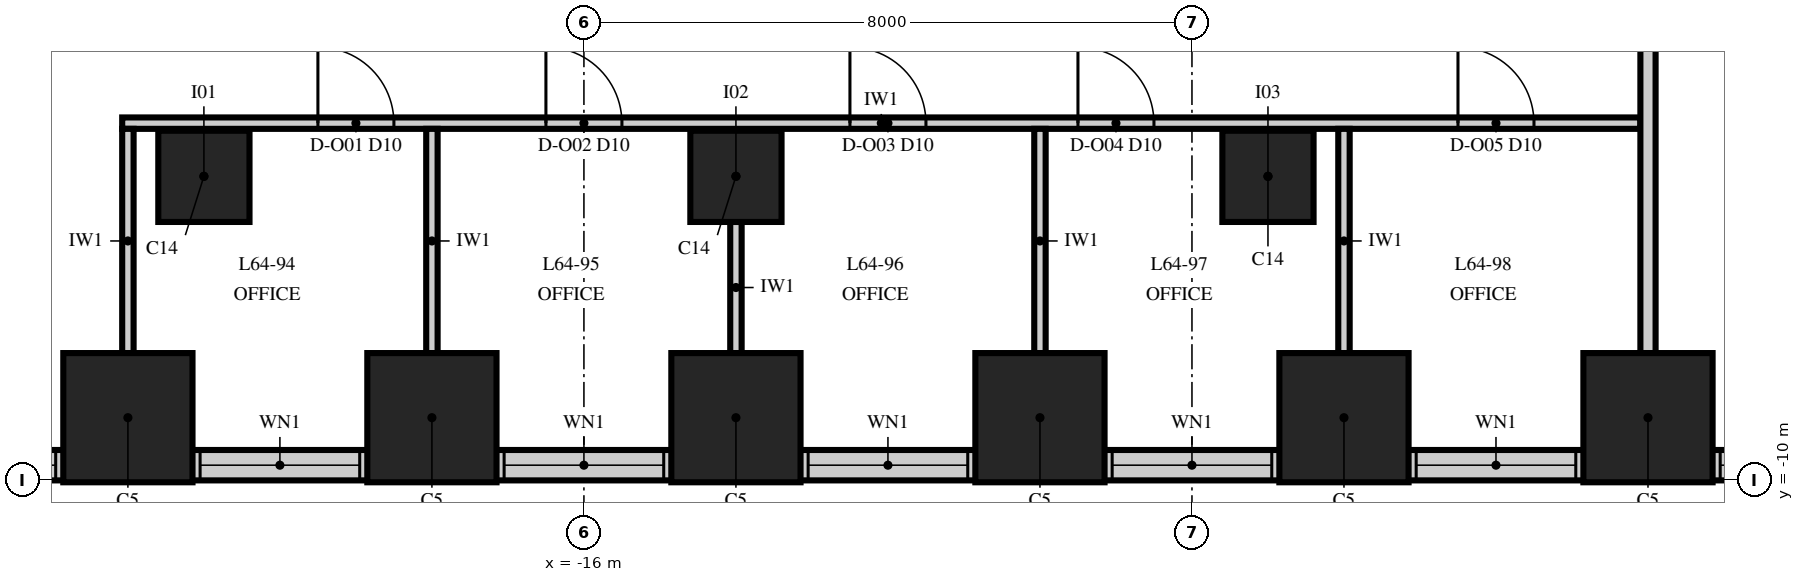
"""IFC4 building model, lengths in metres.
Left out: names, types, materials, properties, quantities, classifications, styles, units other than length and angle.
Written with IfcOpenShell. Run it as: python <this file> out.ifc"""

import sys

from ifc_helpers import new_model, si_unit, direction, frame, frame_2d, origin, origin_2d, place, context, subcontext, project, spatial, rectangle, extrude, element, fill, save


model = new_model("IFC4")
c1 = context("Model", 3, precision=1e-05, world=origin(), true_north=direction((0.0, 1.0)))
c2 = subcontext(c1, "Body", "Model", "MODEL_VIEW")
j1 = project(units=[si_unit("LENGTHUNIT", "METRE"), si_unit("PLANEANGLEUNIT", "RADIAN")], contexts=[c1])
p1 = place(None, origin())
s1 = spatial("IfcSite", under=j1, at=p1, CompositionType="ELEMENT")
p2 = place(p1, origin())
s2 = spatial("IfcBuilding", under=s1, at=p2, CompositionType="ELEMENT")
p3 = place(p2, frame((0.0, 0.0, 276.0)))
s3 = spatial("IfcBuildingStorey", under=s2, at=p3, CompositionType="ELEMENT", Elevation=276.0)
for number, where, z_axis, x_axis in (
    (1, (-22.0, -9.175, 0.0), (0.0, 0.0, 1.0), (1.0, 0.0, 0.0)),
    (2, (-18.0, -9.175, 0.0), (0.0, 0.0, 1.0), (1.0, 0.0, 0.0)),
    (3, (-14.0, -9.175, 0.0), (0.0, 0.0, 1.0), (1.0, 0.0, 0.0)),
    (4, (-10.0, -9.175, 0.0), (0.0, 0.0, 1.0), (1.0, 0.0, 0.0)),
    (5, (-6.0, -9.175, 0.0), (0.0, 0.0, 1.0), (1.0, 0.0, 0.0)),
    (6, (-2.0, -9.175, 0.0), (0.0, 0.0, 1.0), (1.0, 0.0, 0.0)),
):
    element("IfcColumn", number, at=place(p3, frame(where, z_axis=z_axis, x_axis=x_axis)), inside=s3, PredefinedType="COLUMN", context=c2, shape_type="SweptSolid", body=[
        extrude(rectangle(XDim=1.7, YDim=1.7, at=origin_2d()), origin(), (0.0, 0.0, 1.0), 4.0),
    ])
for number, where, z_axis, x_axis in (
    (7, (-21.0, -6.0, 0.0), (0.0, 0.0, 1.0), (1.0, 0.0, 0.0)),
    (8, (-14.0, -6.0, 0.0), (0.0, 0.0, 1.0), (1.0, 0.0, 0.0)),
    (9, (-7.0, -6.0, 0.0), (0.0, 0.0, 1.0), (1.0, 0.0, 0.0)),
):
    element("IfcColumn", number, at=place(p3, frame(where, z_axis=z_axis, x_axis=x_axis)), inside=s3, PredefinedType="COLUMN", context=c2, shape_type="SweptSolid", body=[
        extrude(rectangle(XDim=1.2, YDim=1.2, at=origin_2d()), origin(), (0.0, 0.0, 1.0), 4.0),
    ])
p4 = place(p3, frame((-26.0, -9.8, 0.0), z_axis=(0.0, 0.0, 1.0), x_axis=(1.0, 0.0, 0.0)))
e10 = element("IfcWall", 10, at=p4, inside=s3, PredefinedType="SOLIDWALL", context=c2, shape_type="SweptSolid", body=[
    extrude(rectangle(XDim=52.0, YDim=0.4, at=frame_2d((26.0, 0.0))), origin(), (0.0, 0.0, 1.0), 2.0),
])
p5 = place(p4, frame((0.95, 0.0, 0.8)))
e11 = element("IfcOpeningElement", 11, at=p5, cuts=e10, PredefinedType="OPENING", context=c2, shape_type="SweptSolid", body=[
    extrude(rectangle(XDim=2.1, YDim=1.15, at=frame_2d((1.05, 0.575))), frame((0.0, 0.215, 0.0), z_axis=(0.0, -1.0, 0.0), x_axis=(1.0, 0.0, 0.0)), (0.0, 0.0, 1.0), 0.43),
])
p6 = place(p4, frame((4.95, 0.0, 0.8)))
e12 = element("IfcOpeningElement", 12, at=p6, cuts=e10, PredefinedType="OPENING", context=c2, shape_type="SweptSolid", body=[
    extrude(rectangle(XDim=2.1, YDim=1.15, at=frame_2d((1.05, 0.575))), frame((0.0, 0.215, 0.0), z_axis=(0.0, -1.0, 0.0), x_axis=(1.0, 0.0, 0.0)), (0.0, 0.0, 1.0), 0.43),
])
p7 = place(p4, frame((8.95, 0.0, 0.8)))
e13 = element("IfcOpeningElement", 13, at=p7, cuts=e10, PredefinedType="OPENING", context=c2, shape_type="SweptSolid", body=[
    extrude(rectangle(XDim=2.1, YDim=1.15, at=frame_2d((1.05, 0.575))), frame((0.0, 0.215, 0.0), z_axis=(0.0, -1.0, 0.0), x_axis=(1.0, 0.0, 0.0)), (0.0, 0.0, 1.0), 0.43),
])
p8 = place(p4, frame((12.95, 0.0, 0.8)))
e14 = element("IfcOpeningElement", 14, at=p8, cuts=e10, PredefinedType="OPENING", context=c2, shape_type="SweptSolid", body=[
    extrude(rectangle(XDim=2.1, YDim=1.15, at=frame_2d((1.05, 0.575))), frame((0.0, 0.215, 0.0), z_axis=(0.0, -1.0, 0.0), x_axis=(1.0, 0.0, 0.0)), (0.0, 0.0, 1.0), 0.43),
])
p9 = place(p4, frame((16.95, 0.0, 0.8)))
e15 = element("IfcOpeningElement", 15, at=p9, cuts=e10, PredefinedType="OPENING", context=c2, shape_type="SweptSolid", body=[
    extrude(rectangle(XDim=2.1, YDim=1.15, at=frame_2d((1.05, 0.575))), frame((0.0, 0.215, 0.0), z_axis=(0.0, -1.0, 0.0), x_axis=(1.0, 0.0, 0.0)), (0.0, 0.0, 1.0), 0.43),
])
p10 = place(p4, frame((20.95, 0.0, 0.8)))
e16 = element("IfcOpeningElement", 16, at=p10, cuts=e10, PredefinedType="OPENING", context=c2, shape_type="SweptSolid", body=[
    extrude(rectangle(XDim=2.1, YDim=1.15, at=frame_2d((1.05, 0.575))), frame((0.0, 0.215, 0.0), z_axis=(0.0, -1.0, 0.0), x_axis=(1.0, 0.0, 0.0)), (0.0, 0.0, 1.0), 0.43),
])
p11 = place(p4, frame((24.95, 0.0, 0.8)))
e17 = element("IfcOpeningElement", 17, at=p11, cuts=e10, PredefinedType="OPENING", context=c2, shape_type="SweptSolid", body=[
    extrude(rectangle(XDim=2.1, YDim=1.15, at=frame_2d((1.05, 0.575))), frame((0.0, 0.215, 0.0), z_axis=(0.0, -1.0, 0.0), x_axis=(1.0, 0.0, 0.0)), (0.0, 0.0, 1.0), 0.43),
])
p12 = place(p4, frame((28.95, 0.0, 0.8)))
e18 = element("IfcOpeningElement", 18, at=p12, cuts=e10, PredefinedType="OPENING", context=c2, shape_type="SweptSolid", body=[
    extrude(rectangle(XDim=2.1, YDim=1.15, at=frame_2d((1.05, 0.575))), frame((0.0, 0.215, 0.0), z_axis=(0.0, -1.0, 0.0), x_axis=(1.0, 0.0, 0.0)), (0.0, 0.0, 1.0), 0.43),
])
p13 = place(p4, frame((32.95, 0.0, 0.8)))
e19 = element("IfcOpeningElement", 19, at=p13, cuts=e10, PredefinedType="OPENING", context=c2, shape_type="SweptSolid", body=[
    extrude(rectangle(XDim=2.1, YDim=1.15, at=frame_2d((1.05, 0.575))), frame((0.0, 0.215, 0.0), z_axis=(0.0, -1.0, 0.0), x_axis=(1.0, 0.0, 0.0)), (0.0, 0.0, 1.0), 0.43),
])
p14 = place(p4, frame((36.95, 0.0, 0.8)))
e20 = element("IfcOpeningElement", 20, at=p14, cuts=e10, PredefinedType="OPENING", context=c2, shape_type="SweptSolid", body=[
    extrude(rectangle(XDim=2.1, YDim=1.15, at=frame_2d((1.05, 0.575))), frame((0.0, 0.215, 0.0), z_axis=(0.0, -1.0, 0.0), x_axis=(1.0, 0.0, 0.0)), (0.0, 0.0, 1.0), 0.43),
])
p15 = place(p4, frame((40.95, 0.0, 0.8)))
e21 = element("IfcOpeningElement", 21, at=p15, cuts=e10, PredefinedType="OPENING", context=c2, shape_type="SweptSolid", body=[
    extrude(rectangle(XDim=2.1, YDim=1.15, at=frame_2d((1.05, 0.575))), frame((0.0, 0.215, 0.0), z_axis=(0.0, -1.0, 0.0), x_axis=(1.0, 0.0, 0.0)), (0.0, 0.0, 1.0), 0.43),
])
p16 = place(p4, frame((44.95, 0.0, 0.8)))
e22 = element("IfcOpeningElement", 22, at=p16, cuts=e10, PredefinedType="OPENING", context=c2, shape_type="SweptSolid", body=[
    extrude(rectangle(XDim=2.1, YDim=1.15, at=frame_2d((1.05, 0.575))), frame((0.0, 0.215, 0.0), z_axis=(0.0, -1.0, 0.0), x_axis=(1.0, 0.0, 0.0)), (0.0, 0.0, 1.0), 0.43),
])
p17 = place(p4, frame((48.95, 0.0, 0.8)))
e23 = element("IfcOpeningElement", 23, at=p17, cuts=e10, PredefinedType="OPENING", context=c2, shape_type="SweptSolid", body=[
    extrude(rectangle(XDim=2.1, YDim=1.15, at=frame_2d((1.05, 0.575))), frame((0.0, 0.215, 0.0), z_axis=(0.0, -1.0, 0.0), x_axis=(1.0, 0.0, 0.0)), (0.0, 0.0, 1.0), 0.43),
])
p18 = place(p3, frame((-22.075, -5.3, 0.0), z_axis=(0.0, 0.0, 1.0), x_axis=(1.0, 0.0, 0.0)))
e24 = element("IfcWall", 24, at=p18, inside=s3, PredefinedType="PARTITIONING", context=c2, shape_type="SweptSolid", body=[
    extrude(rectangle(XDim=19.975, YDim=0.15, at=frame_2d((9.987, 0.0))), origin(), (0.0, 0.0, 1.0), 3.23),
])
p19 = place(p18, frame((2.575, 0.0, 0.0)))
e25 = element("IfcOpeningElement", 25, at=p19, cuts=e24, PredefinedType="OPENING", context=c2, shape_type="SweptSolid", body=[
    extrude(rectangle(XDim=1.0, YDim=2.3, at=frame_2d((0.5, 1.15))), frame((0.0, 0.09, 0.0), z_axis=(0.0, -1.0, 0.0), x_axis=(1.0, 0.0, 0.0)), (0.0, 0.0, 1.0), 0.18),
])
p20 = place(p18, frame((5.575, 0.0, 0.0)))
e26 = element("IfcOpeningElement", 26, at=p20, cuts=e24, PredefinedType="OPENING", context=c2, shape_type="SweptSolid", body=[
    extrude(rectangle(XDim=1.0, YDim=2.3, at=frame_2d((0.5, 1.15))), frame((0.0, 0.09, 0.0), z_axis=(0.0, -1.0, 0.0), x_axis=(1.0, 0.0, 0.0)), (0.0, 0.0, 1.0), 0.18),
])
p21 = place(p18, frame((9.575, 0.0, 0.0)))
e27 = element("IfcOpeningElement", 27, at=p21, cuts=e24, PredefinedType="OPENING", context=c2, shape_type="SweptSolid", body=[
    extrude(rectangle(XDim=1.0, YDim=2.3, at=frame_2d((0.5, 1.15))), frame((0.0, 0.09, 0.0), z_axis=(0.0, -1.0, 0.0), x_axis=(1.0, 0.0, 0.0)), (0.0, 0.0, 1.0), 0.18),
])
p22 = place(p18, frame((12.575, 0.0, 0.0)))
e28 = element("IfcOpeningElement", 28, at=p22, cuts=e24, PredefinedType="OPENING", context=c2, shape_type="SweptSolid", body=[
    extrude(rectangle(XDim=1.0, YDim=2.3, at=frame_2d((0.5, 1.15))), frame((0.0, 0.09, 0.0), z_axis=(0.0, -1.0, 0.0), x_axis=(1.0, 0.0, 0.0)), (0.0, 0.0, 1.0), 0.18),
])
p23 = place(p18, frame((17.575, 0.0, 0.0)))
e29 = element("IfcOpeningElement", 29, at=p23, cuts=e24, PredefinedType="OPENING", context=c2, shape_type="SweptSolid", body=[
    extrude(rectangle(XDim=1.0, YDim=2.3, at=frame_2d((0.5, 1.15))), frame((0.0, 0.09, 0.0), z_axis=(0.0, -1.0, 0.0), x_axis=(1.0, 0.0, 0.0)), (0.0, 0.0, 1.0), 0.18),
])
for number, where, z_axis, x_axis in (
    (30, (-22.0, -8.325, 0.0), (0.0, 0.0, 1.0), (0.0, 1.0, 0.0)),
    (31, (-18.0, -8.325, 0.0), (0.0, 0.0, 1.0), (0.0, 1.0, 0.0)),
):
    element("IfcWall", number, at=place(p3, frame(where, z_axis=z_axis, x_axis=x_axis)), inside=s3, PredefinedType="PARTITIONING", context=c2, shape_type="SweptSolid", body=[
        extrude(rectangle(XDim=2.95, YDim=0.15, at=frame_2d((1.475, 0.0))), origin(), (0.0, 0.0, 1.0), 2.842),
    ])
p24 = place(p3, frame((-14.0, -8.325, 0.0), z_axis=(0.0, 0.0, 1.0), x_axis=(0.0, 1.0, 0.0)))
e32 = element("IfcWall", 32, at=p24, inside=s3, PredefinedType="PARTITIONING", context=c2, shape_type="SweptSolid", body=[
    extrude(rectangle(XDim=1.725, YDim=0.15, at=frame_2d((0.862, 0.0))), origin(), (0.0, 0.0, 1.0), 3.23),
])
for number, where, z_axis, x_axis in (
    (33, (-10.0, -8.325, 0.0), (0.0, 0.0, 1.0), (0.0, 1.0, 0.0)),
    (34, (-6.0, -8.325, 0.0), (0.0, 0.0, 1.0), (0.0, 1.0, 0.0)),
):
    element("IfcWall", number, at=place(p3, frame(where, z_axis=z_axis, x_axis=x_axis)), inside=s3, PredefinedType="PARTITIONING", context=c2, shape_type="SweptSolid", body=[
        extrude(rectangle(XDim=2.95, YDim=0.15, at=frame_2d((1.475, 0.0))), origin(), (0.0, 0.0, 1.0), 2.842),
    ])
p25 = place(p3, frame((-2.0, -8.325, 0.0), z_axis=(0.0, 0.0, 1.0), x_axis=(0.0, 1.0, 0.0)))
e35 = element("IfcWall", 35, at=p25, inside=s3, PredefinedType="PARTITIONING", context=c2, shape_type="SweptSolid", body=[
    extrude(rectangle(XDim=12.175, YDim=0.2, at=frame_2d((6.087, 0.0))), origin(), (0.0, 0.0, 1.0), 2.842),
])
p26 = place(p5, origin())
e36 = element("IfcWindow", 36, at=p26, inside=s3, PartitioningType="SINGLE_PANEL", PredefinedType="WINDOW", context=c2, shape_type="SweptSolid", body=[
    extrude(rectangle(XDim=2.1, YDim=1.15, at=frame_2d((1.05, 0.575))), frame((0.0, 0.03, 0.0), z_axis=(0.0, -1.0, 0.0), x_axis=(1.0, 0.0, 0.0)), (0.0, 0.0, 1.0), 0.06),
])
fill(e11, e36)
p27 = place(p6, origin())
e37 = element("IfcWindow", 37, at=p27, inside=s3, PartitioningType="SINGLE_PANEL", PredefinedType="WINDOW", context=c2, shape_type="SweptSolid", body=[
    extrude(rectangle(XDim=2.1, YDim=1.15, at=frame_2d((1.05, 0.575))), frame((0.0, 0.03, 0.0), z_axis=(0.0, -1.0, 0.0), x_axis=(1.0, 0.0, 0.0)), (0.0, 0.0, 1.0), 0.06),
])
fill(e12, e37)
p28 = place(p7, origin())
e38 = element("IfcWindow", 38, at=p28, inside=s3, PartitioningType="SINGLE_PANEL", PredefinedType="WINDOW", context=c2, shape_type="SweptSolid", body=[
    extrude(rectangle(XDim=2.1, YDim=1.15, at=frame_2d((1.05, 0.575))), frame((0.0, 0.03, 0.0), z_axis=(0.0, -1.0, 0.0), x_axis=(1.0, 0.0, 0.0)), (0.0, 0.0, 1.0), 0.06),
])
fill(e13, e38)
p29 = place(p8, origin())
e39 = element("IfcWindow", 39, at=p29, inside=s3, PartitioningType="SINGLE_PANEL", PredefinedType="WINDOW", context=c2, shape_type="SweptSolid", body=[
    extrude(rectangle(XDim=2.1, YDim=1.15, at=frame_2d((1.05, 0.575))), frame((0.0, 0.03, 0.0), z_axis=(0.0, -1.0, 0.0), x_axis=(1.0, 0.0, 0.0)), (0.0, 0.0, 1.0), 0.06),
])
fill(e14, e39)
p30 = place(p9, origin())
e40 = element("IfcWindow", 40, at=p30, inside=s3, PartitioningType="SINGLE_PANEL", PredefinedType="WINDOW", context=c2, shape_type="SweptSolid", body=[
    extrude(rectangle(XDim=2.1, YDim=1.15, at=frame_2d((1.05, 0.575))), frame((0.0, 0.03, 0.0), z_axis=(0.0, -1.0, 0.0), x_axis=(1.0, 0.0, 0.0)), (0.0, 0.0, 1.0), 0.06),
])
fill(e15, e40)
p31 = place(p10, origin())
e41 = element("IfcWindow", 41, at=p31, inside=s3, PartitioningType="SINGLE_PANEL", PredefinedType="WINDOW", context=c2, shape_type="SweptSolid", body=[
    extrude(rectangle(XDim=2.1, YDim=1.15, at=frame_2d((1.05, 0.575))), frame((0.0, 0.03, 0.0), z_axis=(0.0, -1.0, 0.0), x_axis=(1.0, 0.0, 0.0)), (0.0, 0.0, 1.0), 0.06),
])
fill(e16, e41)
p32 = place(p11, origin())
e42 = element("IfcWindow", 42, at=p32, inside=s3, PartitioningType="SINGLE_PANEL", PredefinedType="WINDOW", context=c2, shape_type="SweptSolid", body=[
    extrude(rectangle(XDim=2.1, YDim=1.15, at=frame_2d((1.05, 0.575))), frame((0.0, 0.03, 0.0), z_axis=(0.0, -1.0, 0.0), x_axis=(1.0, 0.0, 0.0)), (0.0, 0.0, 1.0), 0.06),
])
fill(e17, e42)
p33 = place(p19, origin())
e43 = element("IfcDoor", 43, at=p33, inside=s3, OperationType="SINGLE_SWING_LEFT", PredefinedType="DOOR", context=c2, shape_type="SweptSolid", body=[
    extrude(rectangle(XDim=1.0, YDim=2.3, at=frame_2d((0.5, 1.15))), frame((0.0, 0.075, 0.0), z_axis=(0.0, -1.0, 0.0), x_axis=(1.0, 0.0, 0.0)), (0.0, 0.0, 1.0), 0.149),
])
fill(e25, e43)
p34 = place(p20, origin())
e44 = element("IfcDoor", 44, at=p34, inside=s3, OperationType="SINGLE_SWING_LEFT", PredefinedType="DOOR", context=c2, shape_type="SweptSolid", body=[
    extrude(rectangle(XDim=1.0, YDim=2.3, at=frame_2d((0.5, 1.15))), frame((0.0, 0.075, 0.0), z_axis=(0.0, -1.0, 0.0), x_axis=(1.0, 0.0, 0.0)), (0.0, 0.0, 1.0), 0.149),
])
fill(e26, e44)
p35 = place(p21, origin())
e45 = element("IfcDoor", 45, at=p35, inside=s3, OperationType="SINGLE_SWING_LEFT", PredefinedType="DOOR", context=c2, shape_type="SweptSolid", body=[
    extrude(rectangle(XDim=1.0, YDim=2.3, at=frame_2d((0.5, 1.15))), frame((0.0, 0.075, 0.0), z_axis=(0.0, -1.0, 0.0), x_axis=(1.0, 0.0, 0.0)), (0.0, 0.0, 1.0), 0.149),
])
fill(e27, e45)
p36 = place(p22, origin())
e46 = element("IfcDoor", 46, at=p36, inside=s3, OperationType="SINGLE_SWING_LEFT", PredefinedType="DOOR", context=c2, shape_type="SweptSolid", body=[
    extrude(rectangle(XDim=1.0, YDim=2.3, at=frame_2d((0.5, 1.15))), frame((0.0, 0.075, 0.0), z_axis=(0.0, -1.0, 0.0), x_axis=(1.0, 0.0, 0.0)), (0.0, 0.0, 1.0), 0.149),
])
fill(e28, e46)
p37 = place(p23, origin())
e47 = element("IfcDoor", 47, at=p37, inside=s3, OperationType="SINGLE_SWING_LEFT", PredefinedType="DOOR", context=c2, shape_type="SweptSolid", body=[
    extrude(rectangle(XDim=1.0, YDim=2.3, at=frame_2d((0.5, 1.15))), frame((0.0, 0.075, 0.0), z_axis=(0.0, -1.0, 0.0), x_axis=(1.0, 0.0, 0.0)), (0.0, 0.0, 1.0), 0.149),
])
fill(e29, e47)
save(model, sys.argv[1])
